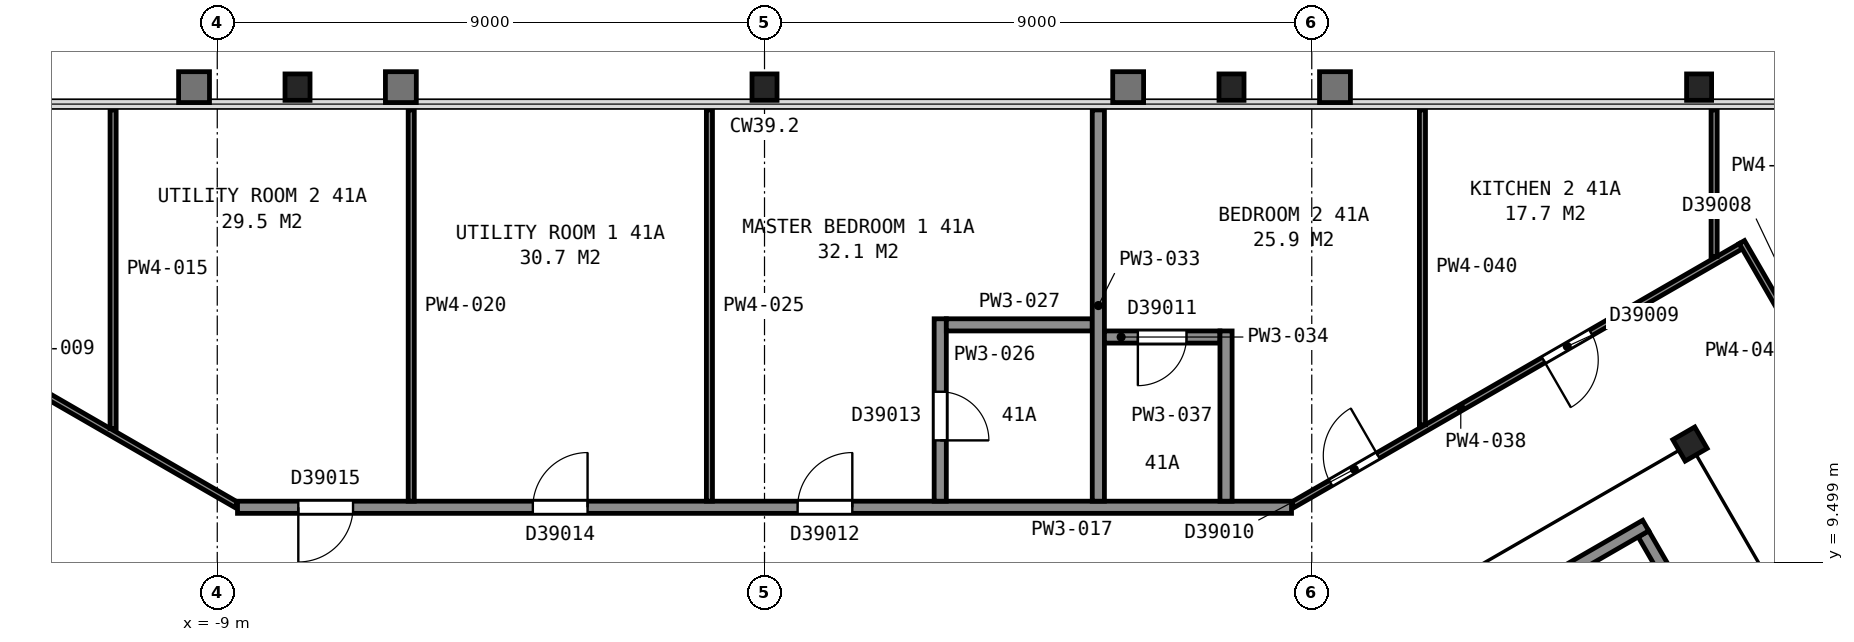
"""IFC4 building model, lengths in metres.
Left out: names, types, materials, properties, quantities, classifications, styles, units other than length and angle.
Written with IfcOpenShell. Run it as: python <this file> out.ifc"""

import sys

from ifc_helpers import new_model, si_unit, direction, frame, frame_2d, origin, origin_2d, place, context, subcontext, project, spatial, rectangle, i_section, extrude, element, fill, save


model = new_model("IFC4")
c1 = context("Model", 3, precision=1e-05, world=origin(), true_north=direction((0.0, 1.0)))
c2 = subcontext(c1, "Body", "Model", "MODEL_VIEW")
j1 = project(units=[si_unit("LENGTHUNIT", "METRE"), si_unit("PLANEANGLEUNIT", "RADIAN")], contexts=[c1])
p1 = place(None, origin())
s1 = spatial("IfcSite", under=j1, at=p1, CompositionType="ELEMENT")
p2 = place(p1, origin())
s2 = spatial("IfcBuilding", under=s1, at=p2, CompositionType="ELEMENT")
p3 = place(p2, frame((0.0, 0.0, 167.3)))
s3 = spatial("IfcBuildingStorey", under=s2, at=p3, CompositionType="ELEMENT", Elevation=167.3)
for number, where, z_axis, x_axis in (
    (1, (15.37, 17.31, 0.0), (0.0, 0.0, 1.0), (1.0, 0.0, 0.0)),
    (2, (7.68, 17.31, 0.0), (0.0, 0.0, 1.0), (1.0, 0.0, 0.0)),
    (3, (0.0, 17.31, 0.0), (0.0, 0.0, 1.0), (1.0, 0.0, 0.0)),
    (4, (-7.68, 17.31, 0.0), (0.0, 0.0, 1.0), (1.0, 0.0, 0.0)),
):
    element("IfcColumn", number, at=place(p3, frame(where, z_axis=z_axis, x_axis=x_axis)), inside=s3, PredefinedType="COLUMN", context=c2, shape_type="SweptSolid", body=[
        extrude(i_section(OverallWidth=0.411, OverallDepth=0.434, WebThickness=0.036, FlangeThickness=0.057, FilletRadius=0.015, at=origin_2d()), origin(), (0.0, 0.0, 1.0), 3.7),
    ])
p4 = place(p3, frame((15.22, 11.44, 0.0), z_axis=(0.0, 0.0, 1.0), x_axis=(0.5, -0.866025403784, 0.0)))
e5 = element("IfcColumn", 5, at=p4, inside=s3, PredefinedType="COLUMN", context=c2, shape_type="SweptSolid", body=[
    extrude(i_section(OverallWidth=0.406, OverallDepth=0.417, WebThickness=0.03, FlangeThickness=0.048, FilletRadius=0.015, at=origin_2d()), origin(), (0.0, 0.0, 1.0), 3.7),
])
p5 = place(p3, frame((15.855, 7.538, 0.0), z_axis=(0.0, 0.0, 1.0), x_axis=(-0.500049511043, 0.865996816683, 0.0)))
e6 = element("IfcWall", 6, at=p5, inside=s3, PredefinedType="PARTITIONING", context=c2, shape_type="SweptSolid", body=[
    extrude(rectangle(XDim=2.8, YDim=0.2, at=frame_2d((1.4, 0.0))), origin(), (0.0, 0.0, 1.0), 3.45),
])
p6 = place(p5, frame((0.85, 0.0, 0.0)))
e7 = element("IfcOpeningElement", 7, at=p6, cuts=e6, PredefinedType="OPENING", context=c2, shape_type="SweptSolid", body=[
    extrude(rectangle(XDim=1.1, YDim=2.1, at=frame_2d((0.55, 1.05))), frame((0.0, 0.11, 0.0), z_axis=(0.0, -1.0, 0.0), x_axis=(1.0, 0.0, 0.0)), (0.0, 0.0, 1.0), 0.22),
])
for number, where, z_axis, x_axis in (
    (8, (6.178, 5.299, 0.0), (0.0, 0.0, 1.0), (0.866, 0.5, 0.0)),
    (9, (-6.178, 5.299, 0.0), (0.0, 0.0, 1.0), (-0.866, 0.5, 0.0)),
):
    element("IfcWall", number, at=place(p3, frame(where, z_axis=z_axis, x_axis=x_axis)), inside=s3, PredefinedType="PARTITIONING", context=c2, shape_type="SweptSolid", body=[
        extrude(rectangle(XDim=9.6, YDim=0.2, at=frame_2d((4.8, 0.0))), origin(), (0.0, 0.0, 1.0), 3.45),
    ])
p7 = place(p3, frame((-16.055, 14.693, 0.0), z_axis=(0.0, 0.0, 1.0), x_axis=(0.866070360466, -0.499922124658, 0.0)))
e10 = element("IfcWall", 10, at=p7, inside=s3, PredefinedType="PARTITIONING", context=c2, shape_type="SweptSolid", body=[
    extrude(rectangle(XDim=8.503, YDim=0.1, at=frame_2d((4.251, 0.0))), origin(), (0.0, 0.0, 1.0), 2.713),
])
p8 = place(p3, frame((-10.713, 11.697, 0.0), z_axis=(0.0, 0.0, 1.0), x_axis=(0.0, 1.0, 0.0)))
e11 = element("IfcWall", 11, at=p8, inside=s3, PredefinedType="PARTITIONING", context=c2, shape_type="SweptSolid", body=[
    extrude(rectangle(XDim=5.239, YDim=0.1, at=frame_2d((2.619, 0.0))), origin(), (0.0, 0.0, 1.0), 2.713),
])
p9 = place(p3, frame((-8.667, 10.4, 0.0), z_axis=(0.0, 0.0, 1.0), x_axis=(1.0, 0.0, 0.0)))
e12 = element("IfcWall", 12, at=p9, inside=s3, PredefinedType="PARTITIONING", context=c2, shape_type="SweptSolid", body=[
    extrude(rectangle(XDim=17.334, YDim=0.2, at=frame_2d((8.667, 0.0))), origin(), (0.0, 0.0, 1.0), 2.713),
])
p10 = place(p9, frame((9.211, 0.0, 0.0)))
e13 = element("IfcOpeningElement", 13, at=p10, cuts=e12, PredefinedType="OPENING", context=c2, shape_type="SweptSolid", body=[
    extrude(rectangle(XDim=0.9, YDim=2.1, at=frame_2d((0.45, 1.05))), frame((0.0, 0.11, 0.0), z_axis=(0.0, -1.0, 0.0), x_axis=(1.0, 0.0, 0.0)), (0.0, 0.0, 1.0), 0.22),
])
p11 = place(p9, frame((4.857, 0.0, 0.0)))
e14 = element("IfcOpeningElement", 14, at=p11, cuts=e12, PredefinedType="OPENING", context=c2, shape_type="SweptSolid", body=[
    extrude(rectangle(XDim=0.9, YDim=2.1, at=frame_2d((0.45, 1.05))), frame((0.0, 0.11, 0.0), z_axis=(0.0, -1.0, 0.0), x_axis=(1.0, 0.0, 0.0)), (0.0, 0.0, 1.0), 0.22),
])
p12 = place(p9, frame((1.0, 0.0, 0.0)))
e15 = element("IfcOpeningElement", 15, at=p12, cuts=e12, PredefinedType="OPENING", context=c2, shape_type="SweptSolid", body=[
    extrude(rectangle(XDim=0.9, YDim=2.1, at=frame_2d((0.45, 1.05))), frame((0.0, 0.11, 0.0), z_axis=(0.0, -1.0, 0.0), x_axis=(1.0, 0.0, 0.0)), (0.0, 0.0, 1.0), 0.22),
])
for number, where, z_axis, x_axis in (
    (16, (-5.81, 10.5, 0.0), (0.0, 0.0, 1.0), (0.0, 1.0, 0.0)),
    (17, (-0.906, 10.5, 0.0), (0.0, 0.0, 1.0), (0.0, 1.0, 0.0)),
):
    element("IfcWall", number, at=place(p3, frame(where, z_axis=z_axis, x_axis=x_axis)), inside=s3, PredefinedType="PARTITIONING", context=c2, shape_type="SweptSolid", body=[
        extrude(rectangle(XDim=6.435, YDim=0.1, at=frame_2d((3.218, 0.0))), origin(), (0.0, 0.0, 1.0), 2.713),
    ])
p13 = place(p3, frame((2.89, 13.5, 0.0), z_axis=(0.0, 0.0, 1.0), x_axis=(0.0, -1.0, 0.0)))
e18 = element("IfcWall", 18, at=p13, inside=s3, PredefinedType="PARTITIONING", context=c2, shape_type="SweptSolid", body=[
    extrude(rectangle(XDim=3.0, YDim=0.2, at=frame_2d((1.5, 0.0))), origin(), (0.0, 0.0, 1.0), 2.713),
])
p14 = place(p13, frame((1.2, 0.0, 0.0)))
e19 = element("IfcOpeningElement", 19, at=p14, cuts=e18, PredefinedType="OPENING", context=c2, shape_type="SweptSolid", body=[
    extrude(rectangle(XDim=0.8, YDim=2.1, at=frame_2d((0.4, 1.05))), frame((0.0, 0.11, 0.0), z_axis=(0.0, -1.0, 0.0), x_axis=(1.0, 0.0, 0.0)), (0.0, 0.0, 1.0), 0.22),
])
p15 = place(p3, frame((2.99, 13.4, 0.0), z_axis=(0.0, 0.0, 1.0), x_axis=(1.0, 0.0, 0.0)))
e20 = element("IfcWall", 20, at=p15, inside=s3, PredefinedType="PARTITIONING", context=c2, shape_type="SweptSolid", body=[
    extrude(rectangle(XDim=2.4, YDim=0.2, at=frame_2d((1.2, 0.0))), origin(), (0.0, 0.0, 1.0), 2.713),
])
p16 = place(p3, frame((5.49, 10.5, 0.0), z_axis=(0.0, 0.0, 1.0), x_axis=(0.0, 1.0, 0.0)))
e21 = element("IfcWall", 21, at=p16, inside=s3, PredefinedType="PARTITIONING", context=c2, shape_type="SweptSolid", body=[
    extrude(rectangle(XDim=6.435, YDim=0.2, at=frame_2d((3.218, 0.0))), origin(), (0.0, 0.0, 1.0), 2.713),
])
p17 = place(p3, frame((7.49, 13.2, 0.0), z_axis=(0.0, 0.0, 1.0), x_axis=(-1.0, 0.0, 0.0)))
e22 = element("IfcWall", 22, at=p17, inside=s3, PredefinedType="PARTITIONING", context=c2, shape_type="SweptSolid", body=[
    extrude(rectangle(XDim=1.9, YDim=0.2, at=frame_2d((0.95, 0.0))), origin(), (0.0, 0.0, 1.0), 2.713),
])
p18 = place(p17, frame((0.55, 0.0, 0.0)))
e23 = element("IfcOpeningElement", 23, at=p18, cuts=e22, PredefinedType="OPENING", context=c2, shape_type="SweptSolid", body=[
    extrude(rectangle(XDim=0.8, YDim=2.1, at=frame_2d((0.4, 1.05))), frame((0.0, 0.11, 0.0), z_axis=(0.0, -1.0, 0.0), x_axis=(1.0, 0.0, 0.0)), (0.0, 0.0, 1.0), 0.22),
])
p19 = place(p3, frame((7.59, 10.5, 0.0), z_axis=(0.0, 0.0, 1.0), x_axis=(0.0, 1.0, 0.0)))
e24 = element("IfcWall", 24, at=p19, inside=s3, PredefinedType="PARTITIONING", context=c2, shape_type="SweptSolid", body=[
    extrude(rectangle(XDim=2.8, YDim=0.2, at=frame_2d((1.4, 0.0))), origin(), (0.0, 0.0, 1.0), 2.713),
])
p20 = place(p3, frame((8.691, 10.442, 0.0), z_axis=(0.0, 0.0, 1.0), x_axis=(0.866070360466, 0.499922124658, 0.0)))
e25 = element("IfcWall", 25, at=p20, inside=s3, PredefinedType="PARTITIONING", context=c2, shape_type="SweptSolid", body=[
    extrude(rectangle(XDim=8.503, YDim=0.1, at=frame_2d((4.251, 0.0))), origin(), (0.0, 0.0, 1.0), 2.713),
])
p21 = place(p20, frame((4.758, 0.0, 0.0)))
e26 = element("IfcOpeningElement", 26, at=p21, cuts=e25, PredefinedType="OPENING", context=c2, shape_type="SweptSolid", body=[
    extrude(rectangle(XDim=0.9, YDim=2.1, at=frame_2d((0.45, 1.05))), frame((0.0, 0.06, 0.0), z_axis=(0.0, -1.0, 0.0), x_axis=(1.0, 0.0, 0.0)), (0.0, 0.0, 1.0), 0.12),
])
p22 = place(p20, frame((0.715, 0.0, 0.0)))
e27 = element("IfcOpeningElement", 27, at=p22, cuts=e25, PredefinedType="OPENING", context=c2, shape_type="SweptSolid", body=[
    extrude(rectangle(XDim=0.9, YDim=2.1, at=frame_2d((0.45, 1.05))), frame((0.0, 0.06, 0.0), z_axis=(0.0, -1.0, 0.0), x_axis=(1.0, 0.0, 0.0)), (0.0, 0.0, 1.0), 0.12),
])
p23 = place(p3, frame((10.82, 11.758, 0.0), z_axis=(0.0, 0.0, 1.0), x_axis=(0.0, 1.0, 0.0)))
e28 = element("IfcWall", 28, at=p23, inside=s3, PredefinedType="PARTITIONING", context=c2, shape_type="SweptSolid", body=[
    extrude(rectangle(XDim=5.177, YDim=0.1, at=frame_2d((2.589, 0.0))), origin(), (0.0, 0.0, 1.0), 2.713),
])
p24 = place(p3, frame((15.617, 14.527, 0.0), z_axis=(0.0, 0.0, 1.0), x_axis=(0.0, 1.0, 0.0)))
e29 = element("IfcWall", 29, at=p24, inside=s3, PredefinedType="PARTITIONING", context=c2, shape_type="SweptSolid", body=[
    extrude(rectangle(XDim=2.408, YDim=0.1, at=frame_2d((1.204, 0.0))), origin(), (0.0, 0.0, 1.0), 2.713),
])
p25 = place(p3, frame((16.073, 14.761, 0.0), z_axis=(0.0, 0.0, 1.0), x_axis=(0.500297300687, -0.865853689098, 0.0)))
e30 = element("IfcWall", 30, at=p25, inside=s3, PredefinedType="PARTITIONING", context=c2, shape_type="SweptSolid", body=[
    extrude(rectangle(XDim=9.496, YDim=0.1, at=frame_2d((4.748, 0.0))), origin(), (0.0, 0.0, 1.0), 2.713),
])
p26 = place(p25, frame((4.15, 0.0, 0.0)))
e31 = element("IfcOpeningElement", 31, at=p26, cuts=e30, PredefinedType="OPENING", context=c2, shape_type="SweptSolid", body=[
    extrude(rectangle(XDim=1.2, YDim=2.1, at=frame_2d((0.6, 1.05))), frame((0.0, 0.06, 0.0), z_axis=(0.0, -1.0, 0.0), x_axis=(1.0, 0.0, 0.0)), (0.0, 0.0, 1.0), 0.12),
])
p27 = place(p10, origin())
e32 = element("IfcDoor", 32, at=p27, inside=s3, OperationType="SINGLE_SWING_RIGHT", PredefinedType="DOOR", context=c2, shape_type="SweptSolid", body=[
    extrude(rectangle(XDim=0.9, YDim=2.1, at=frame_2d((0.45, 1.05))), frame((0.0, 0.025, 0.0), z_axis=(0.0, -1.0, 0.0), x_axis=(1.0, 0.0, 0.0)), (0.0, 0.0, 1.0), 0.05),
])
fill(e13, e32)
p28 = place(p11, origin())
e33 = element("IfcDoor", 33, at=p28, inside=s3, OperationType="SINGLE_SWING_RIGHT", PredefinedType="DOOR", context=c2, shape_type="SweptSolid", body=[
    extrude(rectangle(XDim=0.9, YDim=2.1, at=frame_2d((0.45, 1.05))), frame((0.0, 0.025, 0.0), z_axis=(0.0, -1.0, 0.0), x_axis=(1.0, 0.0, 0.0)), (0.0, 0.0, 1.0), 0.05),
])
fill(e14, e33)
p29 = place(p12, origin())
e34 = element("IfcDoor", 34, at=p29, inside=s3, OperationType="SINGLE_SWING_LEFT", PredefinedType="DOOR", context=c2, shape_type="SweptSolid", body=[
    extrude(rectangle(XDim=0.9, YDim=2.1, at=frame_2d((0.45, 1.05))), frame((0.0, 0.025, 0.0), z_axis=(0.0, -1.0, 0.0), x_axis=(1.0, 0.0, 0.0)), (0.0, 0.0, 1.0), 0.05),
])
fill(e15, e34)
p30 = place(p14, origin())
e35 = element("IfcDoor", 35, at=p30, inside=s3, OperationType="SINGLE_SWING_RIGHT", PredefinedType="DOOR", context=c2, shape_type="SweptSolid", body=[
    extrude(rectangle(XDim=0.8, YDim=2.1, at=frame_2d((0.4, 1.05))), frame((0.0, 0.025, 0.0), z_axis=(0.0, -1.0, 0.0), x_axis=(1.0, 0.0, 0.0)), (0.0, 0.0, 1.0), 0.05),
])
fill(e19, e35)
p31 = place(p18, origin())
e36 = element("IfcDoor", 36, at=p31, inside=s3, OperationType="SINGLE_SWING_RIGHT", PredefinedType="DOOR", context=c2, shape_type="SweptSolid", body=[
    extrude(rectangle(XDim=0.8, YDim=2.1, at=frame_2d((0.4, 1.05))), frame((0.0, 0.025, 0.0), z_axis=(0.0, -1.0, 0.0), x_axis=(1.0, 0.0, 0.0)), (0.0, 0.0, 1.0), 0.05),
])
fill(e23, e36)
p32 = place(p21, origin())
e37 = element("IfcDoor", 37, at=p32, inside=s3, OperationType="SINGLE_SWING_LEFT", PredefinedType="DOOR", context=c2, shape_type="SweptSolid", body=[
    extrude(rectangle(XDim=0.9, YDim=2.1, at=frame_2d((0.45, 1.05))), frame((0.0, 0.025, 0.0), z_axis=(0.0, -1.0, 0.0), x_axis=(1.0, 0.0, 0.0)), (0.0, 0.0, 1.0), 0.05),
])
fill(e26, e37)
p33 = place(p22, origin())
e38 = element("IfcDoor", 38, at=p33, inside=s3, OperationType="SINGLE_SWING_RIGHT", PredefinedType="DOOR", context=c2, shape_type="SweptSolid", body=[
    extrude(rectangle(XDim=0.9, YDim=2.1, at=frame_2d((0.45, 1.05))), frame((0.0, 0.025, 0.0), z_axis=(0.0, -1.0, 0.0), x_axis=(1.0, 0.0, 0.0)), (0.0, 0.0, 1.0), 0.05),
])
fill(e27, e38)
save(model, sys.argv[1])
